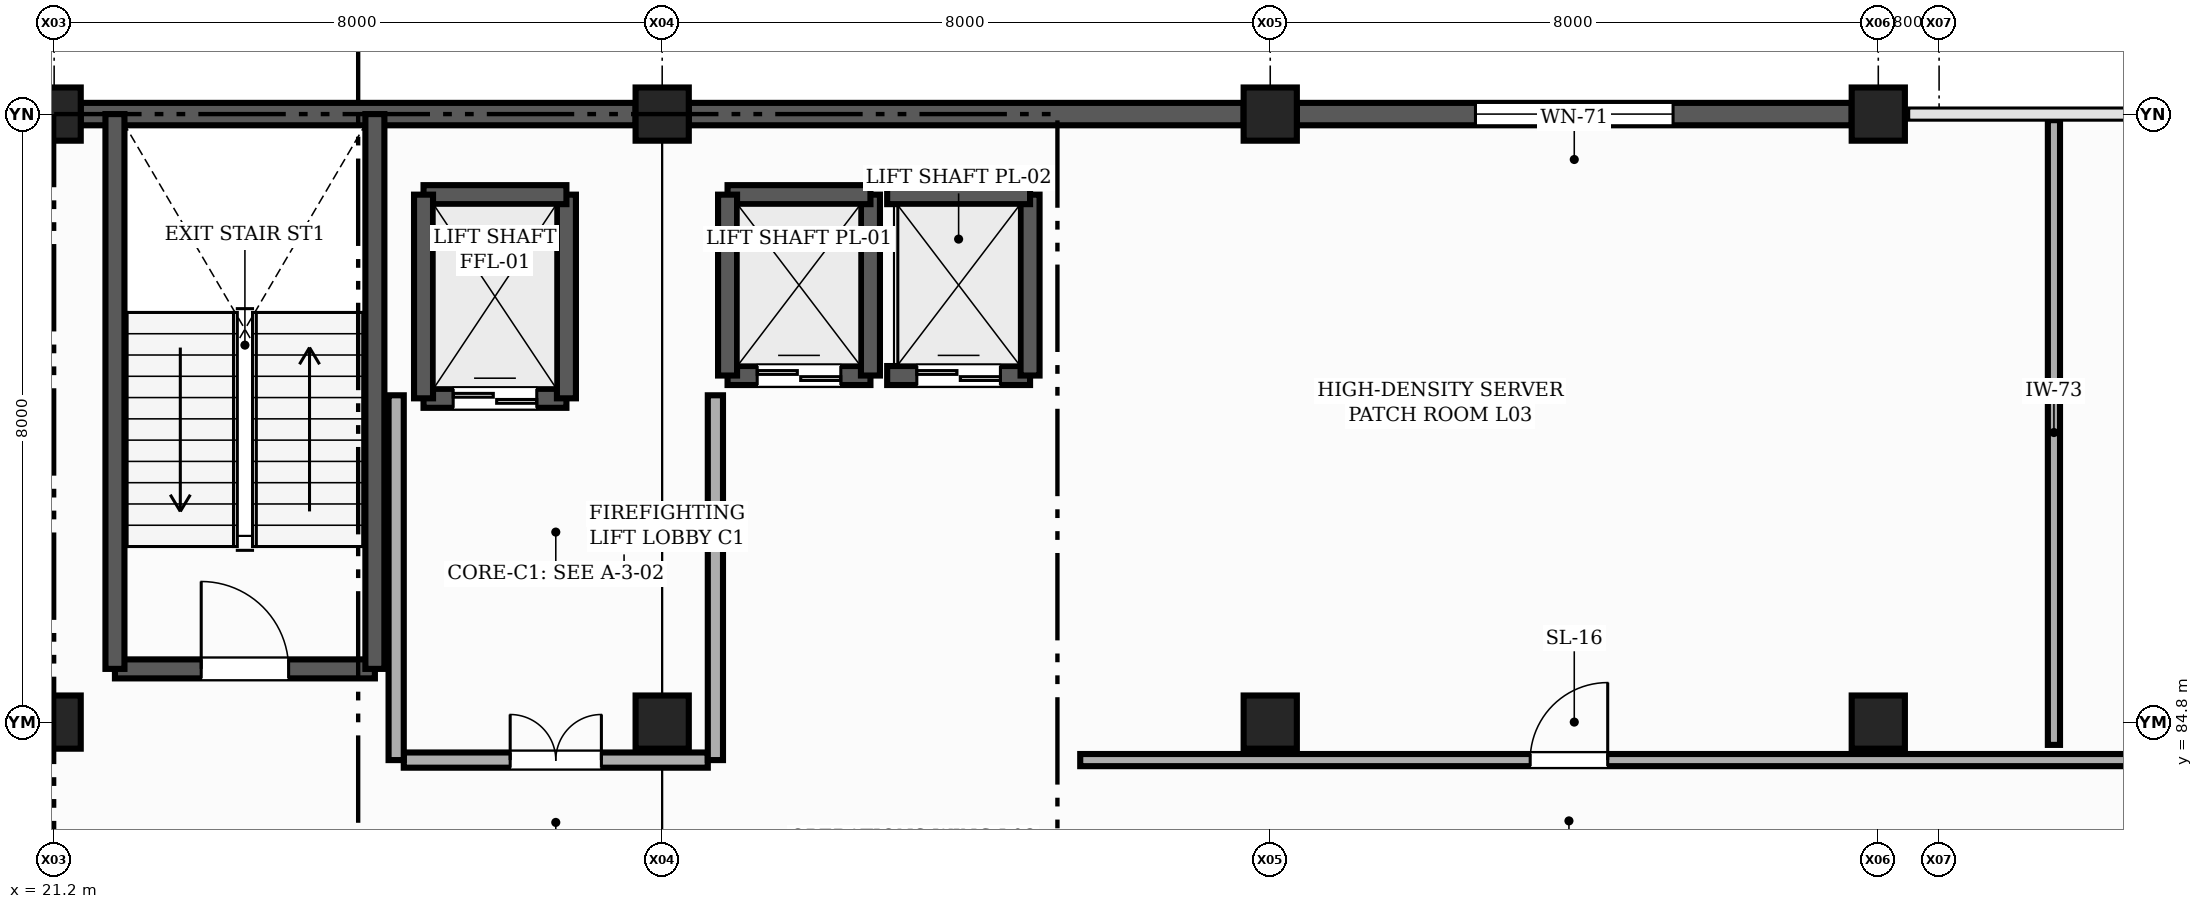
"""IFC4 building model, lengths in metres.
Left out: names, types, materials, properties, quantities, classifications, styles, units other than length and angle.
Written with IfcOpenShell. Run it as: python <this file> out.ifc"""

import sys

from ifc_helpers import new_model, si_unit, direction, frame, frame_2d, origin, origin_2d, place, context, subcontext, project, spatial, rectangle, extrude, element, fill, save


model = new_model("IFC4")
c1 = context("Model", 3, precision=1e-05, world=origin(), true_north=direction((0.0, 1.0)))
c2 = subcontext(c1, "Body", "Model", "MODEL_VIEW")
j1 = project(units=[si_unit("LENGTHUNIT", "METRE"), si_unit("PLANEANGLEUNIT", "RADIAN")], contexts=[c1])
p1 = place(None, origin())
s1 = spatial("IfcSite", under=j1, at=p1, CompositionType="ELEMENT")
p2 = place(p1, origin())
s2 = spatial("IfcBuilding", under=s1, at=p2, CompositionType="ELEMENT")
p3 = place(p2, frame((0.0, 0.0, 13.5)))
s3 = spatial("IfcBuildingStorey", under=s2, at=p3, CompositionType="ELEMENT", Elevation=13.5)
for number, where, z_axis, x_axis in (
    (1, (21.2, 84.8, 0.0), (0.0, 0.0, 1.0), (1.0, 0.0, 0.0)),
    (2, (21.2, 92.8, 0.0), (0.0, 0.0, 1.0), (1.0, 0.0, 0.0)),
    (3, (29.2, 84.8, 0.0), (0.0, 0.0, 1.0), (1.0, 0.0, 0.0)),
    (4, (29.2, 92.8, 0.0), (0.0, 0.0, 1.0), (1.0, 0.0, 0.0)),
    (5, (37.2, 84.8, 0.0), (0.0, 0.0, 1.0), (1.0, 0.0, 0.0)),
    (6, (37.2, 92.8, 0.0), (0.0, 0.0, 1.0), (1.0, 0.0, 0.0)),
    (7, (45.2, 84.8, 0.0), (0.0, 0.0, 1.0), (1.0, 0.0, 0.0)),
    (8, (45.2, 92.8, 0.0), (0.0, 0.0, 1.0), (1.0, 0.0, 0.0)),
):
    element("IfcColumn", number, at=place(p3, frame(where, z_axis=z_axis, x_axis=x_axis)), inside=s3, PredefinedType="COLUMN", context=c2, shape_type="SweptSolid", body=[
        extrude(rectangle(XDim=0.7, YDim=0.7, at=origin_2d()), origin(), (0.0, 0.0, 1.0), 4.5),
    ])
p4 = place(p3, frame((44.85, 92.8, 0.0), z_axis=(0.0, 0.0, 1.0), x_axis=(-1.0, 0.0, 0.0)))
e9 = element("IfcWall", 9, at=p4, inside=s3, PredefinedType="SOLIDWALL", context=c2, shape_type="SweptSolid", body=[
    extrude(rectangle(XDim=7.3, YDim=0.295, at=frame_2d((3.65, 0.0))), origin(), (0.0, 0.0, 1.0), 3.54),
])
p5 = place(p4, frame((2.35, 0.0, 0.9)))
e10 = element("IfcOpeningElement", 10, at=p5, cuts=e9, PredefinedType="OPENING", context=c2, shape_type="SweptSolid", body=[
    extrude(rectangle(XDim=2.6, YDim=1.8, at=frame_2d((1.3, 0.9))), frame((0.0, 0.157, 0.0), z_axis=(0.0, -1.0, 0.0), x_axis=(1.0, 0.0, 0.0)), (0.0, 0.0, 1.0), 0.315),
])
p6 = place(p3, frame((36.85, 92.8, 0.0), z_axis=(0.0, 0.0, 1.0), x_axis=(-1.0, 0.0, 0.0)))
e11 = element("IfcWall", 11, at=p6, inside=s3, PredefinedType="SOLIDWALL", context=c2, shape_type="SweptSolid", body=[
    extrude(rectangle(XDim=7.3, YDim=0.295, at=frame_2d((3.65, 0.0))), origin(), (0.0, 0.0, 1.0), 3.54),
])
p7 = place(p3, frame((28.85, 92.8, 0.0), z_axis=(0.0, 0.0, 1.0), x_axis=(-1.0, 0.0, 0.0)))
e12 = element("IfcWall", 12, at=p7, inside=s3, PredefinedType="SOLIDWALL", context=c2, shape_type="SweptSolid", body=[
    extrude(rectangle(XDim=7.3, YDim=0.295, at=frame_2d((3.65, 0.0))), origin(), (0.0, 0.0, 1.0), 4.19),
])
p8 = place(p3, frame((22.0, 85.5, 0.0), z_axis=(0.0, 0.0, 1.0), x_axis=(1.0, 0.0, 0.0)))
e13 = element("IfcWall", 13, at=p8, inside=s3, PredefinedType="SHEAR", context=c2, shape_type="SweptSolid", body=[
    extrude(rectangle(XDim=3.42, YDim=0.25, at=frame_2d((1.71, 0.0))), origin(), (0.0, 0.0, 1.0), 4.5),
])
p9 = place(p8, frame((1.135, 0.0, 0.0)))
e14 = element("IfcOpeningElement", 14, at=p9, cuts=e13, PredefinedType="OPENING", context=c2, shape_type="SweptSolid", body=[
    extrude(rectangle(XDim=1.15, YDim=2.15, at=frame_2d((0.575, 1.075))), frame((0.0, 0.135, 0.0), z_axis=(0.0, -1.0, 0.0), x_axis=(1.0, 0.0, 0.0)), (0.0, 0.0, 1.0), 0.27),
])
for number, where, z_axis, x_axis in (
    (15, (25.42, 85.5, 0.0), (0.0, 0.0, 1.0), (0.0, 1.0, 0.0)),
    (16, (22.0, 92.8, 0.0), (0.0, 0.0, 1.0), (0.0, -1.0, 0.0)),
):
    element("IfcWall", number, at=place(p3, frame(where, z_axis=z_axis, x_axis=x_axis)), inside=s3, PredefinedType="SHEAR", context=c2, shape_type="SweptSolid", body=[
        extrude(rectangle(XDim=7.3, YDim=0.25, at=frame_2d((3.65, 0.0))), origin(), (0.0, 0.0, 1.0), 4.5),
    ])
p10 = place(p3, frame((26.06, 89.06, 0.0), z_axis=(0.0, 0.0, 1.0), x_axis=(1.0, 0.0, 0.0)))
e17 = element("IfcWall", 17, at=p10, inside=s3, PredefinedType="SHEAR", context=c2, shape_type="SweptSolid", body=[
    extrude(rectangle(XDim=1.88, YDim=0.25, at=frame_2d((0.94, 0.0))), origin(), (0.0, 0.0, 1.0), 4.5),
])
p11 = place(p10, frame((0.39, 0.0, 0.0)))
e18 = element("IfcOpeningElement", 18, at=p11, cuts=e17, PredefinedType="OPENING", context=c2, shape_type="SweptSolid", body=[
    extrude(rectangle(XDim=1.1, YDim=2.2, at=frame_2d((0.55, 1.1))), frame((0.0, 0.135, 0.0), z_axis=(0.0, -1.0, 0.0), x_axis=(1.0, 0.0, 0.0)), (0.0, 0.0, 1.0), 0.27),
])
p12 = place(p3, frame((27.94, 89.06, 0.0), z_axis=(0.0, 0.0, 1.0), x_axis=(0.0, 1.0, 0.0)))
e19 = element("IfcWall", 19, at=p12, inside=s3, PredefinedType="SHEAR", context=c2, shape_type="SweptSolid", body=[
    extrude(rectangle(XDim=2.68, YDim=0.25, at=frame_2d((1.34, 0.0))), origin(), (0.0, 0.0, 1.0), 4.5),
])
p13 = place(p3, frame((27.94, 91.74, 0.0), z_axis=(0.0, 0.0, 1.0), x_axis=(-1.0, 0.0, 0.0)))
e20 = element("IfcWall", 20, at=p13, inside=s3, PredefinedType="SHEAR", context=c2, shape_type="SweptSolid", body=[
    extrude(rectangle(XDim=1.88, YDim=0.25, at=frame_2d((0.94, 0.0))), origin(), (0.0, 0.0, 1.0), 4.5),
])
p14 = place(p3, frame((26.06, 91.74, 0.0), z_axis=(0.0, 0.0, 1.0), x_axis=(0.0, -1.0, 0.0)))
e21 = element("IfcWall", 21, at=p14, inside=s3, PredefinedType="SHEAR", context=c2, shape_type="SweptSolid", body=[
    extrude(rectangle(XDim=2.68, YDim=0.25, at=frame_2d((1.34, 0.0))), origin(), (0.0, 0.0, 1.0), 4.5),
])
p15 = place(p3, frame((30.06, 89.36, 0.0), z_axis=(0.0, 0.0, 1.0), x_axis=(1.0, 0.0, 0.0)))
e22 = element("IfcWall", 22, at=p15, inside=s3, PredefinedType="SHEAR", context=c2, shape_type="SweptSolid", body=[
    extrude(rectangle(XDim=1.88, YDim=0.25, at=frame_2d((0.94, 0.0))), origin(), (0.0, 0.0, 1.0), 4.5),
])
p16 = place(p15, frame((0.39, 0.0, 0.0)))
e23 = element("IfcOpeningElement", 23, at=p16, cuts=e22, PredefinedType="OPENING", context=c2, shape_type="SweptSolid", body=[
    extrude(rectangle(XDim=1.1, YDim=2.2, at=frame_2d((0.55, 1.1))), frame((0.0, 0.135, 0.0), z_axis=(0.0, -1.0, 0.0), x_axis=(1.0, 0.0, 0.0)), (0.0, 0.0, 1.0), 0.27),
])
p17 = place(p3, frame((31.94, 89.36, 0.0), z_axis=(0.0, 0.0, 1.0), x_axis=(0.0, 1.0, 0.0)))
e24 = element("IfcWall", 24, at=p17, inside=s3, PredefinedType="SHEAR", context=c2, shape_type="SweptSolid", body=[
    extrude(rectangle(XDim=2.38, YDim=0.25, at=frame_2d((1.19, 0.0))), origin(), (0.0, 0.0, 1.0), 4.5),
])
p18 = place(p3, frame((31.94, 91.74, 0.0), z_axis=(0.0, 0.0, 1.0), x_axis=(-1.0, 0.0, 0.0)))
e25 = element("IfcWall", 25, at=p18, inside=s3, PredefinedType="SHEAR", context=c2, shape_type="SweptSolid", body=[
    extrude(rectangle(XDim=1.88, YDim=0.25, at=frame_2d((0.94, 0.0))), origin(), (0.0, 0.0, 1.0), 4.5),
])
p19 = place(p3, frame((30.06, 91.74, 0.0), z_axis=(0.0, 0.0, 1.0), x_axis=(0.0, -1.0, 0.0)))
e26 = element("IfcWall", 26, at=p19, inside=s3, PredefinedType="SHEAR", context=c2, shape_type="SweptSolid", body=[
    extrude(rectangle(XDim=2.38, YDim=0.25, at=frame_2d((1.19, 0.0))), origin(), (0.0, 0.0, 1.0), 4.5),
])
p20 = place(p3, frame((32.16, 89.36, 0.0), z_axis=(0.0, 0.0, 1.0), x_axis=(1.0, 0.0, 0.0)))
e27 = element("IfcWall", 27, at=p20, inside=s3, PredefinedType="SHEAR", context=c2, shape_type="SweptSolid", body=[
    extrude(rectangle(XDim=1.88, YDim=0.25, at=frame_2d((0.94, 0.0))), origin(), (0.0, 0.0, 1.0), 4.5),
])
p21 = place(p20, frame((0.39, 0.0, 0.0)))
e28 = element("IfcOpeningElement", 28, at=p21, cuts=e27, PredefinedType="OPENING", context=c2, shape_type="SweptSolid", body=[
    extrude(rectangle(XDim=1.1, YDim=2.2, at=frame_2d((0.55, 1.1))), frame((0.0, 0.135, 0.0), z_axis=(0.0, -1.0, 0.0), x_axis=(1.0, 0.0, 0.0)), (0.0, 0.0, 1.0), 0.27),
])
p22 = place(p3, frame((34.04, 89.36, 0.0), z_axis=(0.0, 0.0, 1.0), x_axis=(0.0, 1.0, 0.0)))
e29 = element("IfcWall", 29, at=p22, inside=s3, PredefinedType="SHEAR", context=c2, shape_type="SweptSolid", body=[
    extrude(rectangle(XDim=2.38, YDim=0.25, at=frame_2d((1.19, 0.0))), origin(), (0.0, 0.0, 1.0), 4.5),
])
p23 = place(p3, frame((34.04, 91.74, 0.0), z_axis=(0.0, 0.0, 1.0), x_axis=(-1.0, 0.0, 0.0)))
e30 = element("IfcWall", 30, at=p23, inside=s3, PredefinedType="SHEAR", context=c2, shape_type="SweptSolid", body=[
    extrude(rectangle(XDim=1.88, YDim=0.25, at=frame_2d((0.94, 0.0))), origin(), (0.0, 0.0, 1.0), 4.5),
])
p24 = place(p3, frame((25.8, 84.3, 0.0), z_axis=(0.0, 0.0, 1.0), x_axis=(1.0, 0.0, 0.0)))
e31 = element("IfcWall", 31, at=p24, inside=s3, PredefinedType="PARTITIONING", context=c2, shape_type="SweptSolid", body=[
    extrude(rectangle(XDim=4.0, YDim=0.2, at=frame_2d((2.0, 0.0))), origin(), (0.0, 0.0, 1.0), 3.575),
])
p25 = place(p24, frame((1.4, 0.0, 0.0)))
e32 = element("IfcOpeningElement", 32, at=p25, cuts=e31, PredefinedType="OPENING", context=c2, shape_type="SweptSolid", body=[
    extrude(rectangle(XDim=1.2, YDim=2.15, at=frame_2d((0.6, 1.075))), frame((0.0, 0.11, 0.0), z_axis=(0.0, -1.0, 0.0), x_axis=(1.0, 0.0, 0.0)), (0.0, 0.0, 1.0), 0.22),
])
p26 = place(p3, frame((25.7, 84.3, 0.0), z_axis=(0.0, 0.0, 1.0), x_axis=(0.0, 1.0, 0.0)))
e33 = element("IfcWall", 33, at=p26, inside=s3, PredefinedType="PARTITIONING", context=c2, shape_type="SweptSolid", body=[
    extrude(rectangle(XDim=4.8, YDim=0.2, at=frame_2d((2.4, 0.0))), origin(), (0.0, 0.0, 1.0), 3.425),
])
p27 = place(p3, frame((29.9, 84.3, 0.0), z_axis=(0.0, 0.0, 1.0), x_axis=(0.0, 1.0, 0.0)))
e34 = element("IfcWall", 34, at=p27, inside=s3, PredefinedType="PARTITIONING", context=c2, shape_type="SweptSolid", body=[
    extrude(rectangle(XDim=4.8, YDim=0.2, at=frame_2d((2.4, 0.0))), origin(), (0.0, 0.0, 1.0), 3.475),
])
p28 = place(p3, frame((47.511, 84.5, 0.0), z_axis=(0.0, 0.0, 1.0), x_axis=(0.0, 1.0, 0.0)))
e35 = element("IfcWall", 35, at=p28, inside=s3, PredefinedType="PARTITIONING", context=c2, shape_type="SweptSolid", body=[
    extrude(rectangle(XDim=8.22, YDim=0.16, at=frame_2d((4.11, 0.0))), origin(), (0.0, 0.0, 1.0), 3.525),
])
p29 = place(p3, frame((34.7, 84.3, 0.0), z_axis=(0.0, 0.0, 1.0), x_axis=(1.0, 0.0, 0.0)))
e36 = element("IfcWall", 36, at=p29, inside=s3, PredefinedType="PARTITIONING", context=c2, shape_type="SweptSolid", body=[
    extrude(rectangle(XDim=35.4, YDim=0.16, at=frame_2d((17.7, 0.0))), origin(), (0.0, 0.0, 1.0), 3.575),
])
p30 = place(p29, frame((5.92, 0.0, 0.0)))
e37 = element("IfcOpeningElement", 37, at=p30, cuts=e36, PredefinedType="OPENING", context=c2, shape_type="SweptSolid", body=[
    extrude(rectangle(XDim=1.02, YDim=2.12, at=frame_2d((0.51, 1.06))), frame((0.0, 0.09, 0.0), z_axis=(0.0, -1.0, 0.0), x_axis=(1.0, 0.0, 0.0)), (0.0, 0.0, 1.0), 0.18),
])
p31 = place(p29, frame((17.2, 0.0, 0.0)))
e38 = element("IfcOpeningElement", 38, at=p31, cuts=e36, PredefinedType="OPENING", context=c2, shape_type="SweptSolid", body=[
    extrude(rectangle(XDim=0.95, YDim=2.15, at=frame_2d((0.475, 1.075))), frame((0.0, 0.09, 0.0), z_axis=(0.0, -1.0, 0.0), x_axis=(1.0, 0.0, 0.0)), (0.0, 0.0, 1.0), 0.18),
])
p32 = place(p29, frame((28.48, 0.0, 0.0)))
e39 = element("IfcOpeningElement", 39, at=p32, cuts=e36, PredefinedType="OPENING", context=c2, shape_type="SweptSolid", body=[
    extrude(rectangle(XDim=1.08, YDim=2.14, at=frame_2d((0.54, 1.07))), frame((0.0, 0.09, 0.0), z_axis=(0.0, -1.0, 0.0), x_axis=(1.0, 0.0, 0.0)), (0.0, 0.0, 1.0), 0.18),
])
p33 = place(p5, origin())
e40 = element("IfcWindow", 40, at=p33, inside=s3, PartitioningType="SINGLE_PANEL", PredefinedType="WINDOW", context=c2, shape_type="SweptSolid", body=[
    extrude(rectangle(XDim=2.6, YDim=1.8, at=frame_2d((1.3, 0.9))), frame((0.0, 0.03, 0.0), z_axis=(0.0, -1.0, 0.0), x_axis=(1.0, 0.0, 0.0)), (0.0, 0.0, 1.0), 0.06),
])
fill(e10, e40)
p34 = place(p9, origin())
e41 = element("IfcDoor", 41, at=p34, inside=s3, OperationType="SINGLE_SWING_LEFT", PredefinedType="DOOR", context=c2, shape_type="SweptSolid", body=[
    extrude(rectangle(XDim=1.15, YDim=2.15, at=frame_2d((0.575, 1.075))), frame((0.0, 0.025, 0.0), z_axis=(0.0, -1.0, 0.0), x_axis=(1.0, 0.0, 0.0)), (0.0, 0.0, 1.0), 0.05),
])
fill(e14, e41)
p35 = place(p11, origin())
e42 = element("IfcDoor", 42, at=p35, inside=s3, OperationType="DOUBLE_DOOR_SLIDING", PredefinedType="DOOR", context=c2, shape_type="SweptSolid", body=[
    extrude(rectangle(XDim=1.1, YDim=2.2, at=frame_2d((0.55, 1.1))), frame((0.0, 0.025, 0.0), z_axis=(0.0, -1.0, 0.0), x_axis=(1.0, 0.0, 0.0)), (0.0, 0.0, 1.0), 0.05),
])
fill(e18, e42)
p36 = place(p16, origin())
e43 = element("IfcDoor", 43, at=p36, inside=s3, OperationType="DOUBLE_DOOR_SLIDING", PredefinedType="DOOR", context=c2, shape_type="SweptSolid", body=[
    extrude(rectangle(XDim=1.1, YDim=2.2, at=frame_2d((0.55, 1.1))), frame((0.0, 0.025, 0.0), z_axis=(0.0, -1.0, 0.0), x_axis=(1.0, 0.0, 0.0)), (0.0, 0.0, 1.0), 0.05),
])
fill(e23, e43)
p37 = place(p21, origin())
e44 = element("IfcDoor", 44, at=p37, inside=s3, OperationType="DOUBLE_DOOR_SLIDING", PredefinedType="DOOR", context=c2, shape_type="SweptSolid", body=[
    extrude(rectangle(XDim=1.1, YDim=2.2, at=frame_2d((0.55, 1.1))), frame((0.0, 0.025, 0.0), z_axis=(0.0, -1.0, 0.0), x_axis=(1.0, 0.0, 0.0)), (0.0, 0.0, 1.0), 0.05),
])
fill(e28, e44)
p38 = place(p25, origin())
e45 = element("IfcDoor", 45, at=p38, inside=s3, OperationType="DOUBLE_DOOR_SINGLE_SWING", PredefinedType="DOOR", context=c2, shape_type="SweptSolid", body=[
    extrude(rectangle(XDim=1.2, YDim=2.15, at=frame_2d((0.6, 1.075))), frame((0.0, 0.025, 0.0), z_axis=(0.0, -1.0, 0.0), x_axis=(1.0, 0.0, 0.0)), (0.0, 0.0, 1.0), 0.05),
])
fill(e32, e45)
p39 = place(p30, origin())
e46 = element("IfcDoor", 46, at=p39, inside=s3, OperationType="SINGLE_SWING_RIGHT", PredefinedType="DOOR", context=c2, shape_type="SweptSolid", body=[
    extrude(rectangle(XDim=1.02, YDim=2.12, at=frame_2d((0.51, 1.06))), frame((0.0, 0.025, 0.0), z_axis=(0.0, -1.0, 0.0), x_axis=(1.0, 0.0, 0.0)), (0.0, 0.0, 1.0), 0.05),
])
fill(e37, e46)
save(model, sys.argv[1])
